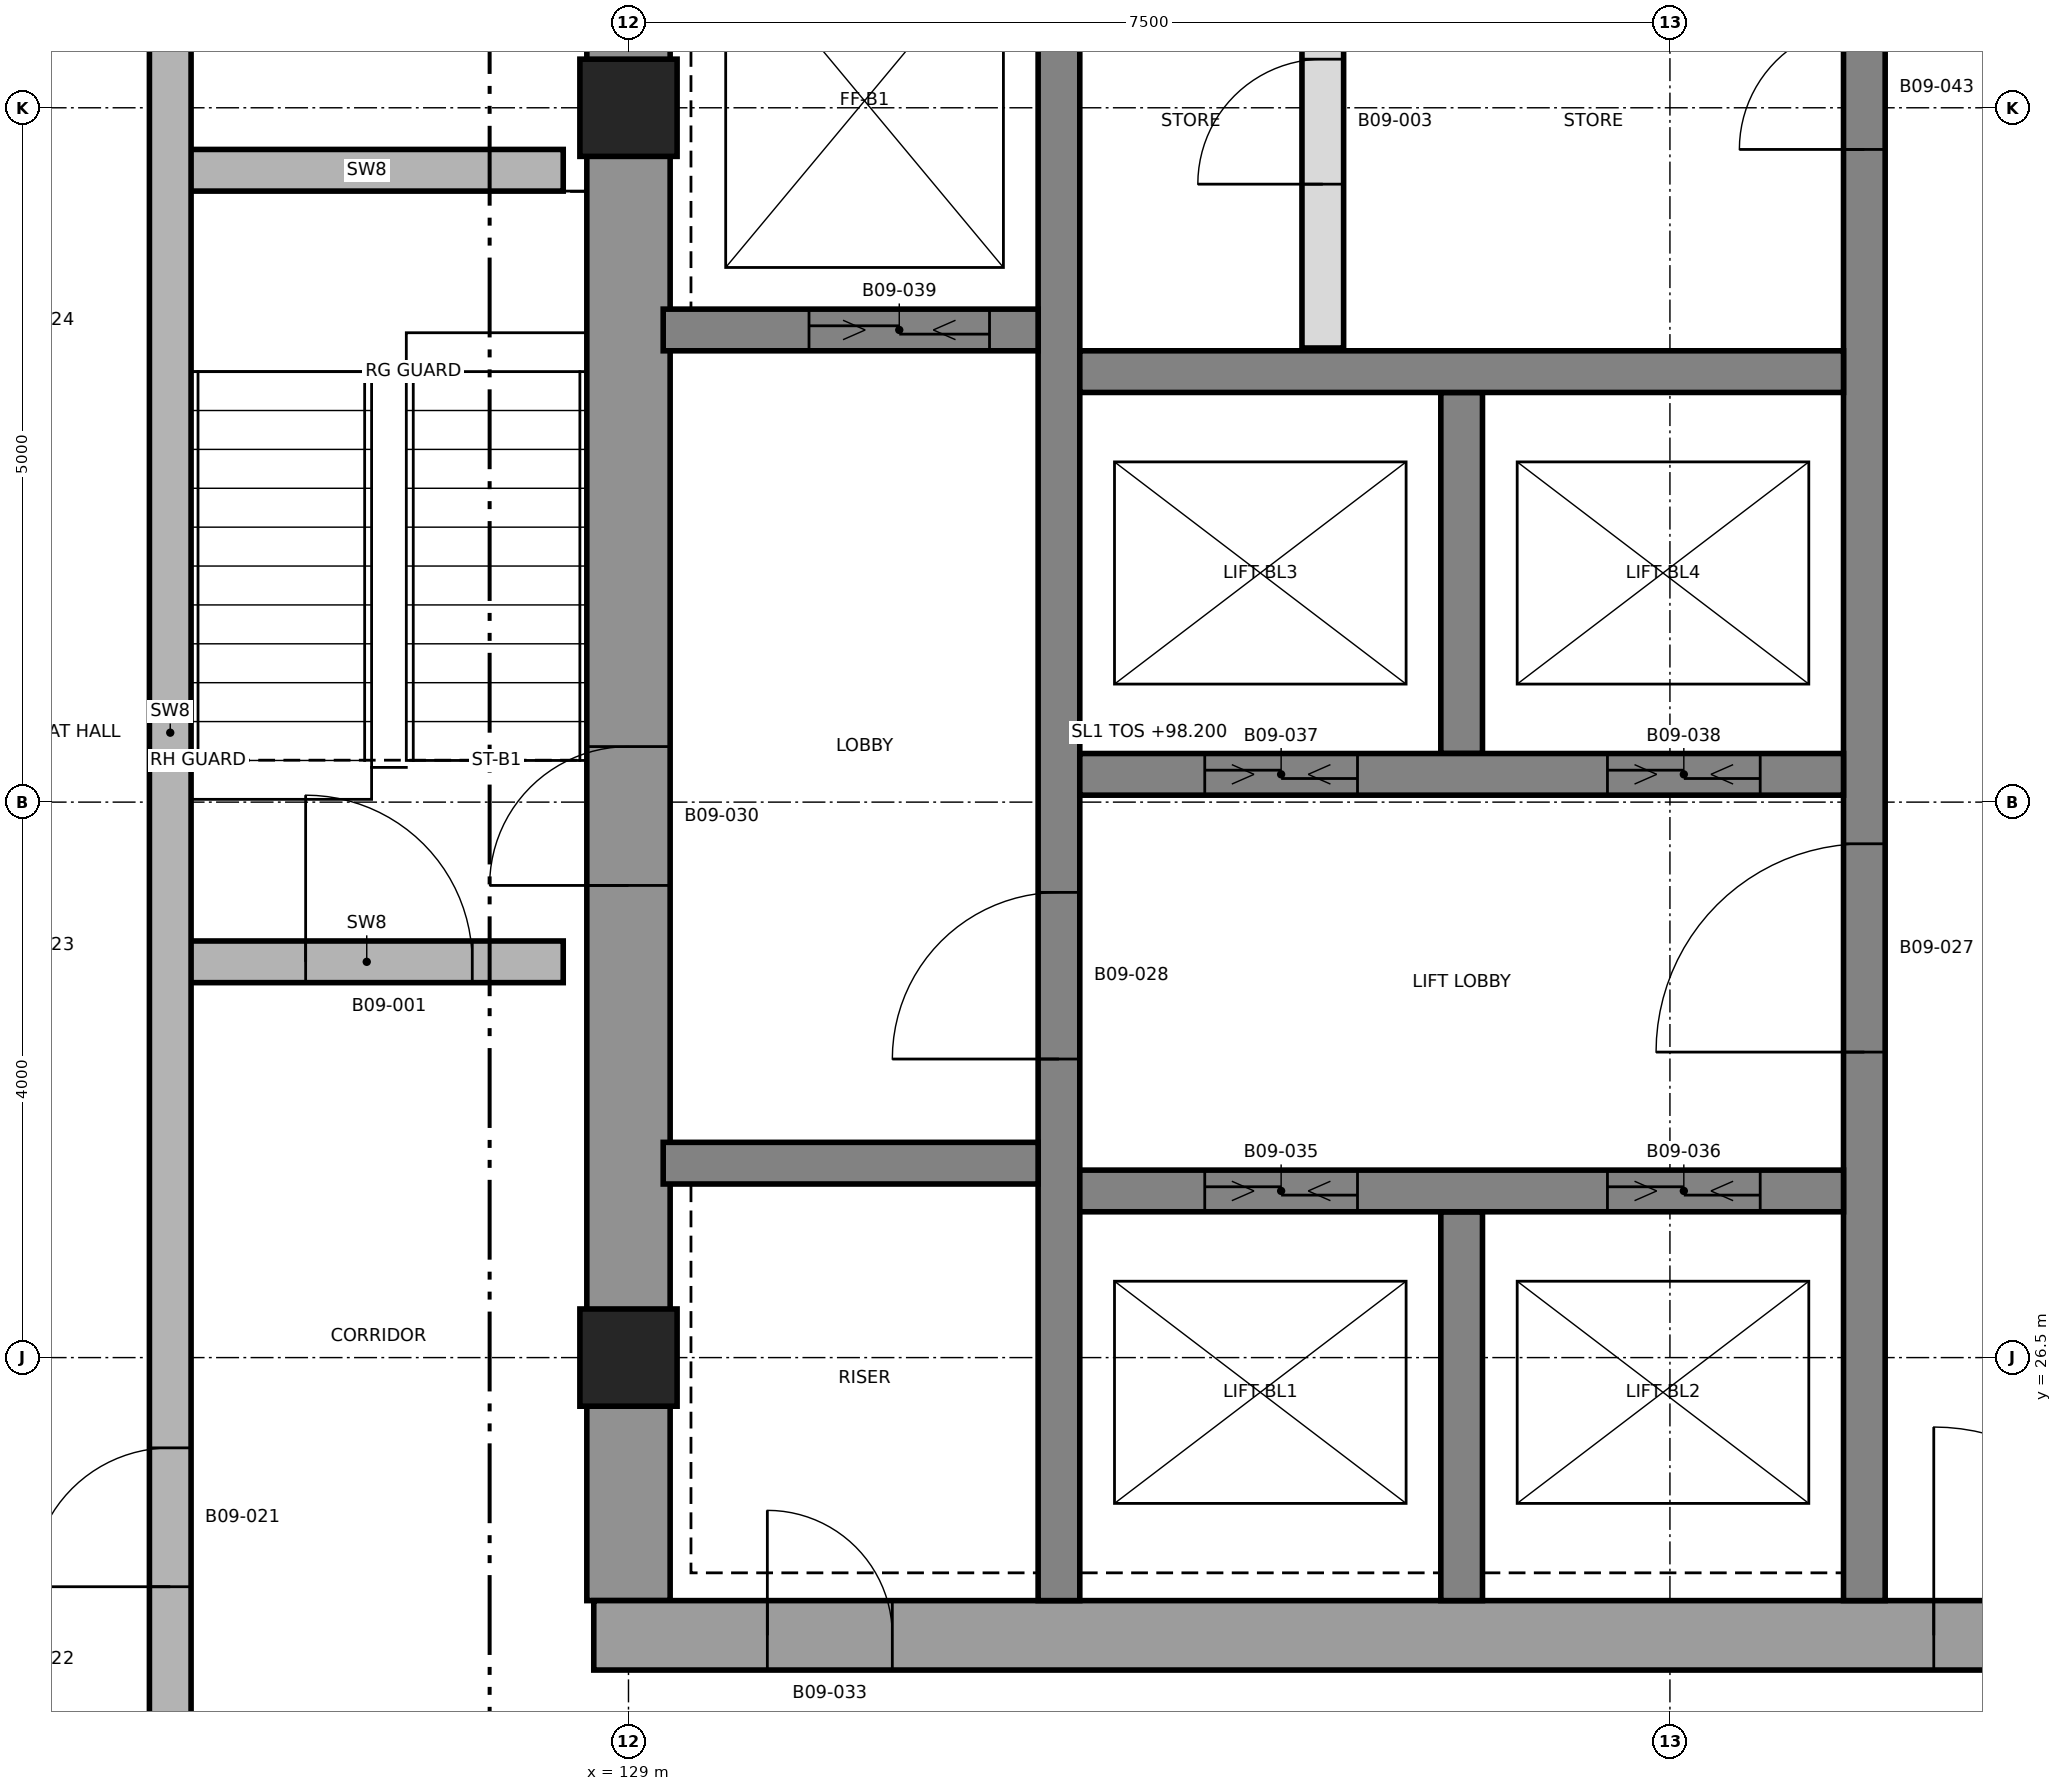
"""IFC4 building model, lengths in metres.
Left out: names, types, materials, properties, quantities, classifications, styles, units other than length and angle.
Written with IfcOpenShell. Run it as: python <this file> out.ifc"""

import sys

from ifc_helpers import new_model, si_unit, direction, frame, frame_2d, origin, origin_2d, place, context, subcontext, project, spatial, rectangle, extrude, element, fill, save


model = new_model("IFC4")
c1 = context("Model", 3, precision=1e-05, world=origin(), true_north=direction((0.0, 1.0)))
c2 = subcontext(c1, "Body", "Model", "MODEL_VIEW")
j1 = project(units=[si_unit("LENGTHUNIT", "METRE"), si_unit("PLANEANGLEUNIT", "RADIAN")], contexts=[c1])
p1 = place(None, origin())
s1 = spatial("IfcSite", under=j1, at=p1, CompositionType="ELEMENT")
p2 = place(p1, origin())
s2 = spatial("IfcBuilding", under=s1, at=p2, CompositionType="ELEMENT")
p3 = place(p2, frame((0.0, 0.0, 98.2)))
s3 = spatial("IfcBuildingStorey", under=s2, at=p3, CompositionType="ELEMENT", Elevation=98.2)
p4 = place(p3, frame((129.0, 24.75, 0.0), z_axis=(0.0, 0.0, 1.0), x_axis=(0.0, 1.0, 0.0)))
e1 = element("IfcWall", 1, at=p4, inside=s3, PredefinedType="SHEAR", context=c2, shape_type="SweptSolid", body=[
    extrude(rectangle(XDim=12.5, YDim=0.6, at=frame_2d((6.25, 0.0))), origin(), (0.0, 0.0, 1.0), 3.7),
])
p5 = place(p4, frame((5.15, 0.0, 0.0)))
e2 = element("IfcOpeningElement", 2, at=p5, cuts=e1, PredefinedType="OPENING", context=c2, shape_type="SweptSolid", body=[
    extrude(rectangle(XDim=1.0, YDim=2.1, at=frame_2d((0.5, 1.05))), frame((0.0, 0.31, 0.0), z_axis=(0.0, -1.0, 0.0), x_axis=(1.0, 0.0, 0.0)), (0.0, 0.0, 1.0), 0.62),
])
p6 = place(p3, frame((128.75, 24.5, 0.0), z_axis=(0.0, 0.0, 1.0), x_axis=(1.0, 0.0, 0.0)))
e3 = element("IfcWall", 3, at=p6, inside=s3, PredefinedType="SHEAR", context=c2, shape_type="SweptSolid", body=[
    extrude(rectangle(XDim=15.0, YDim=0.5, at=frame_2d((7.5, 0.0))), origin(), (0.0, 0.0, 1.0), 3.7),
])
p7 = place(p6, frame((9.65, 0.0, 0.0)))
e4 = element("IfcOpeningElement", 4, at=p7, cuts=e3, PredefinedType="OPENING", context=c2, shape_type="SweptSolid", body=[
    extrude(rectangle(XDim=1.5, YDim=2.1, at=frame_2d((0.75, 1.05))), frame((0.0, 0.26, 0.0), z_axis=(0.0, -1.0, 0.0), x_axis=(1.0, 0.0, 0.0)), (0.0, 0.0, 1.0), 0.52),
])
p8 = place(p6, frame((1.25, 0.0, 0.0)))
e5 = element("IfcOpeningElement", 5, at=p8, cuts=e3, PredefinedType="OPENING", context=c2, shape_type="SweptSolid", body=[
    extrude(rectangle(XDim=0.9, YDim=2.1, at=frame_2d((0.45, 1.05))), frame((0.0, 0.26, 0.0), z_axis=(0.0, -1.0, 0.0), x_axis=(1.0, 0.0, 0.0)), (0.0, 0.0, 1.0), 0.52),
])
p9 = place(p3, frame((132.1, 24.75, 0.0), z_axis=(0.0, 0.0, 1.0), x_axis=(0.0, 1.0, 0.0)))
e6 = element("IfcWall", 6, at=p9, inside=s3, PredefinedType="SHEAR", context=c2, shape_type="SweptSolid", body=[
    extrude(rectangle(XDim=12.5, YDim=0.3, at=frame_2d((6.25, 0.0))), origin(), (0.0, 0.0, 1.0), 3.7),
])
p10 = place(p9, frame((3.9, 0.0, 0.0)))
e7 = element("IfcOpeningElement", 7, at=p10, cuts=e6, PredefinedType="OPENING", context=c2, shape_type="SweptSolid", body=[
    extrude(rectangle(XDim=1.2, YDim=2.1, at=frame_2d((0.6, 1.05))), frame((0.0, 0.16, 0.0), z_axis=(0.0, -1.0, 0.0), x_axis=(1.0, 0.0, 0.0)), (0.0, 0.0, 1.0), 0.32),
])
p11 = place(p3, frame((137.9, 24.75, 0.0), z_axis=(0.0, 0.0, 1.0), x_axis=(0.0, 1.0, 0.0)))
e8 = element("IfcWall", 8, at=p11, inside=s3, PredefinedType="SHEAR", context=c2, shape_type="SweptSolid", body=[
    extrude(rectangle(XDim=12.5, YDim=0.3, at=frame_2d((6.25, 0.0))), origin(), (0.0, 0.0, 1.0), 3.7),
])
p12 = place(p11, frame((3.95, 0.0, 0.0)))
e9 = element("IfcOpeningElement", 9, at=p12, cuts=e8, PredefinedType="OPENING", context=c2, shape_type="SweptSolid", body=[
    extrude(rectangle(XDim=1.5, YDim=2.1, at=frame_2d((0.75, 1.05))), frame((0.0, 0.16, 0.0), z_axis=(0.0, -1.0, 0.0), x_axis=(1.0, 0.0, 0.0)), (0.0, 0.0, 1.0), 0.32),
])
p13 = place(p11, frame((10.45, 0.0, 0.0)))
e10 = element("IfcOpeningElement", 10, at=p13, cuts=e8, PredefinedType="OPENING", context=c2, shape_type="SweptSolid", body=[
    extrude(rectangle(XDim=0.9, YDim=2.1, at=frame_2d((0.45, 1.05))), frame((0.0, 0.16, 0.0), z_axis=(0.0, -1.0, 0.0), x_axis=(1.0, 0.0, 0.0)), (0.0, 0.0, 1.0), 0.32),
])
p14 = place(p3, frame((135.0, 24.75, 0.0), z_axis=(0.0, 0.0, 1.0), x_axis=(0.0, 1.0, 0.0)))
e11 = element("IfcWall", 11, at=p14, inside=s3, PredefinedType="SHEAR", context=c2, shape_type="SweptSolid", body=[
    extrude(rectangle(XDim=2.8, YDim=0.3, at=frame_2d((1.4, 0.0))), origin(), (0.0, 0.0, 1.0), 3.7),
])
p15 = place(p3, frame((135.0, 30.85, 0.0), z_axis=(0.0, 0.0, 1.0), x_axis=(0.0, 1.0, 0.0)))
e12 = element("IfcWall", 12, at=p15, inside=s3, PredefinedType="SHEAR", context=c2, shape_type="SweptSolid", body=[
    extrude(rectangle(XDim=2.6, YDim=0.3, at=frame_2d((1.3, 0.0))), origin(), (0.0, 0.0, 1.0), 3.7),
])
p16 = place(p3, frame((132.25, 27.7, 0.0), z_axis=(0.0, 0.0, 1.0), x_axis=(1.0, 0.0, 0.0)))
e13 = element("IfcWall", 13, at=p16, inside=s3, PredefinedType="SHEAR", context=c2, shape_type="SweptSolid", body=[
    extrude(rectangle(XDim=5.5, YDim=0.3, at=frame_2d((2.75, 0.0))), origin(), (0.0, 0.0, 1.0), 3.7),
])
p17 = place(p16, frame((0.9, 0.0, 0.0)))
e14 = element("IfcOpeningElement", 14, at=p17, cuts=e13, PredefinedType="OPENING", context=c2, shape_type="SweptSolid", body=[
    extrude(rectangle(XDim=1.1, YDim=2.4, at=frame_2d((0.55, 1.2))), frame((0.0, 0.16, 0.0), z_axis=(0.0, -1.0, 0.0), x_axis=(1.0, 0.0, 0.0)), (0.0, 0.0, 1.0), 0.32),
])
p18 = place(p16, frame((3.8, 0.0, 0.0)))
e15 = element("IfcOpeningElement", 15, at=p18, cuts=e13, PredefinedType="OPENING", context=c2, shape_type="SweptSolid", body=[
    extrude(rectangle(XDim=1.1, YDim=2.4, at=frame_2d((0.55, 1.2))), frame((0.0, 0.16, 0.0), z_axis=(0.0, -1.0, 0.0), x_axis=(1.0, 0.0, 0.0)), (0.0, 0.0, 1.0), 0.32),
])
p19 = place(p3, frame((132.25, 30.7, 0.0), z_axis=(0.0, 0.0, 1.0), x_axis=(1.0, 0.0, 0.0)))
e16 = element("IfcWall", 16, at=p19, inside=s3, PredefinedType="SHEAR", context=c2, shape_type="SweptSolid", body=[
    extrude(rectangle(XDim=5.5, YDim=0.3, at=frame_2d((2.75, 0.0))), origin(), (0.0, 0.0, 1.0), 3.7),
])
p20 = place(p19, frame((0.9, 0.0, 0.0)))
e17 = element("IfcOpeningElement", 17, at=p20, cuts=e16, PredefinedType="OPENING", context=c2, shape_type="SweptSolid", body=[
    extrude(rectangle(XDim=1.1, YDim=2.4, at=frame_2d((0.55, 1.2))), frame((0.0, 0.16, 0.0), z_axis=(0.0, -1.0, 0.0), x_axis=(1.0, 0.0, 0.0)), (0.0, 0.0, 1.0), 0.32),
])
p21 = place(p19, frame((3.8, 0.0, 0.0)))
e18 = element("IfcOpeningElement", 18, at=p21, cuts=e16, PredefinedType="OPENING", context=c2, shape_type="SweptSolid", body=[
    extrude(rectangle(XDim=1.1, YDim=2.4, at=frame_2d((0.55, 1.2))), frame((0.0, 0.16, 0.0), z_axis=(0.0, -1.0, 0.0), x_axis=(1.0, 0.0, 0.0)), (0.0, 0.0, 1.0), 0.32),
])
p22 = place(p3, frame((132.25, 33.6, 0.0), z_axis=(0.0, 0.0, 1.0), x_axis=(1.0, 0.0, 0.0)))
e19 = element("IfcWall", 19, at=p22, inside=s3, PredefinedType="SHEAR", context=c2, shape_type="SweptSolid", body=[
    extrude(rectangle(XDim=5.5, YDim=0.3, at=frame_2d((2.75, 0.0))), origin(), (0.0, 0.0, 1.0), 3.7),
])
p23 = place(p3, frame((129.25, 27.9, 0.0), z_axis=(0.0, 0.0, 1.0), x_axis=(1.0, 0.0, 0.0)))
e20 = element("IfcWall", 20, at=p23, inside=s3, PredefinedType="SHEAR", context=c2, shape_type="SweptSolid", body=[
    extrude(rectangle(XDim=2.7, YDim=0.3, at=frame_2d((1.35, 0.0))), origin(), (0.0, 0.0, 1.0), 3.7),
])
p24 = place(p3, frame((129.25, 33.9, 0.0), z_axis=(0.0, 0.0, 1.0), x_axis=(1.0, 0.0, 0.0)))
e21 = element("IfcWall", 21, at=p24, inside=s3, PredefinedType="SHEAR", context=c2, shape_type="SweptSolid", body=[
    extrude(rectangle(XDim=2.7, YDim=0.3, at=frame_2d((1.35, 0.0))), origin(), (0.0, 0.0, 1.0), 3.7),
])
p25 = place(p24, frame((1.05, 0.0, 0.0)))
e22 = element("IfcOpeningElement", 22, at=p25, cuts=e21, PredefinedType="OPENING", context=c2, shape_type="SweptSolid", body=[
    extrude(rectangle(XDim=1.3, YDim=2.4, at=frame_2d((0.65, 1.2))), frame((0.0, 0.16, 0.0), z_axis=(0.0, -1.0, 0.0), x_axis=(1.0, 0.0, 0.0)), (0.0, 0.0, 1.0), 0.32),
])
for number, where, z_axis, x_axis in (
    (23, (129.0, 26.5, 0.0), (0.0, 0.0, 1.0), (1.0, 0.0, 0.0)),
    (24, (129.0, 35.5, 0.0), (0.0, 0.0, 1.0), (1.0, 0.0, 0.0)),
):
    element("IfcColumn", number, at=place(p3, frame(where, z_axis=z_axis, x_axis=x_axis)), inside=s3, PredefinedType="COLUMN", context=c2, shape_type="SweptSolid", body=[
        extrude(rectangle(XDim=0.7, YDim=0.7, at=origin_2d()), origin(), (0.0, 0.0, 1.0), 3.7),
    ])
p26 = place(p3, frame((125.7, 29.35, 0.0), z_axis=(0.0, 0.0, 1.0), x_axis=(1.0, 0.0, 0.0)))
e25 = element("IfcWall", 25, at=p26, inside=s3, PredefinedType="SHEAR", context=c2, shape_type="SweptSolid", body=[
    extrude(rectangle(XDim=2.83, YDim=0.3, at=frame_2d((1.415, 0.0))), origin(), (0.0, 0.0, 1.0), 3.4),
])
p27 = place(p26, frame((0.975, 0.0, 0.0)))
e26 = element("IfcOpeningElement", 26, at=p27, cuts=e25, PredefinedType="OPENING", context=c2, shape_type="SweptSolid", body=[
    extrude(rectangle(XDim=1.2, YDim=2.1, at=frame_2d((0.6, 1.05))), frame((0.0, 0.16, 0.0), z_axis=(0.0, -1.0, 0.0), x_axis=(1.0, 0.0, 0.0)), (0.0, 0.0, 1.0), 0.32),
])
p28 = place(p3, frame((125.7, 35.05, 0.0), z_axis=(0.0, 0.0, 1.0), x_axis=(1.0, 0.0, 0.0)))
e27 = element("IfcWall", 27, at=p28, inside=s3, PredefinedType="SHEAR", context=c2, shape_type="SweptSolid", body=[
    extrude(rectangle(XDim=2.83, YDim=0.3, at=frame_2d((1.415, 0.0))), origin(), (0.0, 0.0, 1.0), 3.4),
])
p29 = place(p3, frame((125.7, 22.15, 0.0), z_axis=(0.0, 0.0, 1.0), x_axis=(0.0, 1.0, 0.0)))
e28 = element("IfcWall", 28, at=p29, inside=s3, PredefinedType="SHEAR", context=c2, shape_type="SweptSolid", body=[
    extrude(rectangle(XDim=17.7, YDim=0.3, at=frame_2d((8.85, 0.0))), origin(), (0.0, 0.0, 1.0), 3.4),
])
p30 = place(p29, frame((2.7, 0.0, 0.0)))
e29 = element("IfcOpeningElement", 29, at=p30, cuts=e28, PredefinedType="OPENING", context=c2, shape_type="SweptSolid", body=[
    extrude(rectangle(XDim=1.0, YDim=2.1, at=frame_2d((0.5, 1.05))), frame((0.0, 0.16, 0.0), z_axis=(0.0, -1.0, 0.0), x_axis=(1.0, 0.0, 0.0)), (0.0, 0.0, 1.0), 0.32),
])
p31 = place(p3, frame((134.0, 33.77, 0.0), z_axis=(0.0, 0.0, 1.0), x_axis=(0.0, 1.0, 0.0)))
e30 = element("IfcWall", 30, at=p31, inside=s3, PredefinedType="PARTITIONING", context=c2, shape_type="SweptSolid", body=[
    extrude(rectangle(XDim=3.26, YDim=0.3, at=frame_2d((1.63, 0.0))), origin(), (0.0, 0.0, 1.0), 3.4),
])
p32 = place(p31, frame((1.18, 0.0, 0.0)))
e31 = element("IfcOpeningElement", 31, at=p32, cuts=e30, PredefinedType="OPENING", context=c2, shape_type="SweptSolid", body=[
    extrude(rectangle(XDim=0.9, YDim=2.1, at=frame_2d((0.45, 1.05))), frame((0.0, 0.16, 0.0), z_axis=(0.0, -1.0, 0.0), x_axis=(1.0, 0.0, 0.0)), (0.0, 0.0, 1.0), 0.32),
])
p33 = place(p27, origin())
e32 = element("IfcDoor", 32, at=p33, inside=s3, OperationType="SINGLE_SWING_LEFT", PredefinedType="DOOR", context=c2, shape_type="SweptSolid", body=[
    extrude(rectangle(XDim=1.2, YDim=2.1, at=frame_2d((0.6, 1.05))), frame((0.0, 0.025, 0.0), z_axis=(0.0, -1.0, 0.0), x_axis=(1.0, 0.0, 0.0)), (0.0, 0.0, 1.0), 0.05),
])
fill(e26, e32)
p34 = place(p32, origin())
e33 = element("IfcDoor", 33, at=p34, inside=s3, OperationType="SINGLE_SWING_LEFT", PredefinedType="DOOR", context=c2, shape_type="SweptSolid", body=[
    extrude(rectangle(XDim=0.9, YDim=2.1, at=frame_2d((0.45, 1.05))), frame((0.0, 0.025, 0.0), z_axis=(0.0, -1.0, 0.0), x_axis=(1.0, 0.0, 0.0)), (0.0, 0.0, 1.0), 0.05),
])
fill(e31, e33)
p35 = place(p30, origin())
e34 = element("IfcDoor", 34, at=p35, inside=s3, OperationType="SINGLE_SWING_LEFT", PredefinedType="DOOR", context=c2, shape_type="SweptSolid", body=[
    extrude(rectangle(XDim=1.0, YDim=2.1, at=frame_2d((0.5, 1.05))), frame((0.0, 0.025, 0.0), z_axis=(0.0, -1.0, 0.0), x_axis=(1.0, 0.0, 0.0)), (0.0, 0.0, 1.0), 0.05),
])
fill(e29, e34)
p36 = place(p12, origin())
e35 = element("IfcDoor", 35, at=p36, inside=s3, OperationType="SINGLE_SWING_RIGHT", PredefinedType="DOOR", context=c2, shape_type="SweptSolid", body=[
    extrude(rectangle(XDim=1.5, YDim=2.1, at=frame_2d((0.75, 1.05))), frame((0.0, 0.025, 0.0), z_axis=(0.0, -1.0, 0.0), x_axis=(1.0, 0.0, 0.0)), (0.0, 0.0, 1.0), 0.05),
])
fill(e9, e35)
p37 = place(p10, origin())
e36 = element("IfcDoor", 36, at=p37, inside=s3, OperationType="SINGLE_SWING_LEFT", PredefinedType="DOOR", context=c2, shape_type="SweptSolid", body=[
    extrude(rectangle(XDim=1.2, YDim=2.1, at=frame_2d((0.6, 1.05))), frame((0.0, 0.025, 0.0), z_axis=(0.0, -1.0, 0.0), x_axis=(1.0, 0.0, 0.0)), (0.0, 0.0, 1.0), 0.05),
])
fill(e7, e36)
p38 = place(p5, origin())
e37 = element("IfcDoor", 37, at=p38, inside=s3, OperationType="SINGLE_SWING_RIGHT", PredefinedType="DOOR", context=c2, shape_type="SweptSolid", body=[
    extrude(rectangle(XDim=1.0, YDim=2.1, at=frame_2d((0.5, 1.05))), frame((0.0, 0.025, 0.0), z_axis=(0.0, -1.0, 0.0), x_axis=(1.0, 0.0, 0.0)), (0.0, 0.0, 1.0), 0.05),
])
fill(e2, e37)
p39 = place(p7, origin())
e38 = element("IfcDoor", 38, at=p39, inside=s3, OperationType="SINGLE_SWING_LEFT", PredefinedType="DOOR", context=c2, shape_type="SweptSolid", body=[
    extrude(rectangle(XDim=1.5, YDim=2.1, at=frame_2d((0.75, 1.05))), frame((0.0, 0.025, 0.0), z_axis=(0.0, -1.0, 0.0), x_axis=(1.0, 0.0, 0.0)), (0.0, 0.0, 1.0), 0.05),
])
fill(e4, e38)
p40 = place(p8, origin())
e39 = element("IfcDoor", 39, at=p40, inside=s3, OperationType="SINGLE_SWING_LEFT", PredefinedType="DOOR", context=c2, shape_type="SweptSolid", body=[
    extrude(rectangle(XDim=0.9, YDim=2.1, at=frame_2d((0.45, 1.05))), frame((0.0, 0.025, 0.0), z_axis=(0.0, -1.0, 0.0), x_axis=(1.0, 0.0, 0.0)), (0.0, 0.0, 1.0), 0.05),
])
fill(e5, e39)
p41 = place(p17, origin())
e40 = element("IfcDoor", 40, at=p41, inside=s3, OperationType="SLIDING_TO_LEFT", PredefinedType="DOOR", context=c2, shape_type="SweptSolid", body=[
    extrude(rectangle(XDim=1.1, YDim=2.4, at=frame_2d((0.55, 1.2))), frame((0.0, 0.025, 0.0), z_axis=(0.0, -1.0, 0.0), x_axis=(1.0, 0.0, 0.0)), (0.0, 0.0, 1.0), 0.05),
])
fill(e14, e40)
p42 = place(p18, origin())
e41 = element("IfcDoor", 41, at=p42, inside=s3, OperationType="SLIDING_TO_LEFT", PredefinedType="DOOR", context=c2, shape_type="SweptSolid", body=[
    extrude(rectangle(XDim=1.1, YDim=2.4, at=frame_2d((0.55, 1.2))), frame((0.0, 0.025, 0.0), z_axis=(0.0, -1.0, 0.0), x_axis=(1.0, 0.0, 0.0)), (0.0, 0.0, 1.0), 0.05),
])
fill(e15, e41)
p43 = place(p20, origin())
e42 = element("IfcDoor", 42, at=p43, inside=s3, OperationType="SLIDING_TO_LEFT", PredefinedType="DOOR", context=c2, shape_type="SweptSolid", body=[
    extrude(rectangle(XDim=1.1, YDim=2.4, at=frame_2d((0.55, 1.2))), frame((0.0, 0.025, 0.0), z_axis=(0.0, -1.0, 0.0), x_axis=(1.0, 0.0, 0.0)), (0.0, 0.0, 1.0), 0.05),
])
fill(e17, e42)
p44 = place(p21, origin())
e43 = element("IfcDoor", 43, at=p44, inside=s3, OperationType="SLIDING_TO_LEFT", PredefinedType="DOOR", context=c2, shape_type="SweptSolid", body=[
    extrude(rectangle(XDim=1.1, YDim=2.4, at=frame_2d((0.55, 1.2))), frame((0.0, 0.025, 0.0), z_axis=(0.0, -1.0, 0.0), x_axis=(1.0, 0.0, 0.0)), (0.0, 0.0, 1.0), 0.05),
])
fill(e18, e43)
p45 = place(p25, origin())
e44 = element("IfcDoor", 44, at=p45, inside=s3, OperationType="SLIDING_TO_LEFT", PredefinedType="DOOR", context=c2, shape_type="SweptSolid", body=[
    extrude(rectangle(XDim=1.3, YDim=2.4, at=frame_2d((0.65, 1.2))), frame((0.0, 0.025, 0.0), z_axis=(0.0, -1.0, 0.0), x_axis=(1.0, 0.0, 0.0)), (0.0, 0.0, 1.0), 0.05),
])
fill(e22, e44)
p46 = place(p13, origin())
e45 = element("IfcDoor", 45, at=p46, inside=s3, OperationType="SINGLE_SWING_RIGHT", PredefinedType="DOOR", context=c2, shape_type="SweptSolid", body=[
    extrude(rectangle(XDim=0.9, YDim=2.1, at=frame_2d((0.45, 1.05))), frame((0.0, 0.025, 0.0), z_axis=(0.0, -1.0, 0.0), x_axis=(1.0, 0.0, 0.0)), (0.0, 0.0, 1.0), 0.05),
])
fill(e10, e45)
save(model, sys.argv[1])
